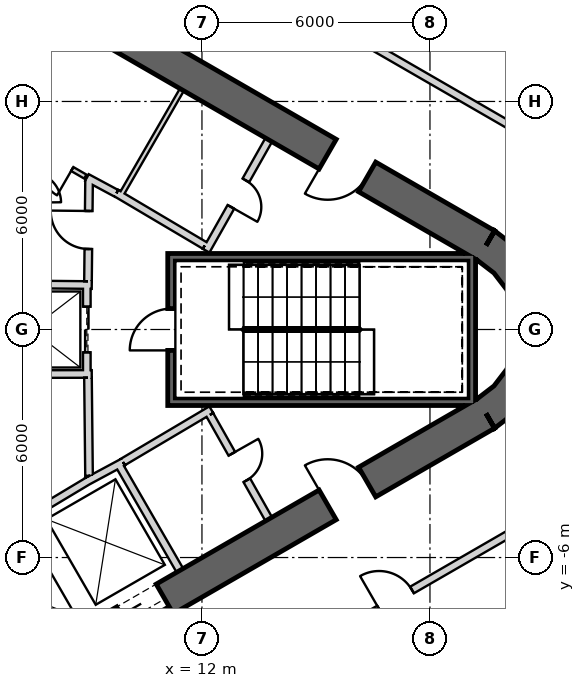
"""IFC4 building model, lengths in metres.
Left out: names, types, materials, properties, quantities, classifications, styles, units other than length and angle.
Written with IfcOpenShell. Run it as: python <this file> out.ifc"""

import sys

from ifc_helpers import new_model, si_unit, direction, frame, frame_2d, origin, place, context, subcontext, project, spatial, polyline, rectangle, outline, extrude, element, fill, save


model = new_model("IFC4")
c1 = context("Model", 3, precision=1e-05, world=origin(), true_north=direction((0.0, 1.0)))
c2 = subcontext(c1, "Body", "Model", "MODEL_VIEW")
j1 = project(units=[si_unit("LENGTHUNIT", "METRE"), si_unit("PLANEANGLEUNIT", "RADIAN")], contexts=[c1])
p1 = place(None, origin())
s1 = spatial("IfcSite", under=j1, at=p1, CompositionType="ELEMENT")
p2 = place(p1, origin())
s2 = spatial("IfcBuilding", under=s1, at=p2, CompositionType="ELEMENT")
p3 = place(p2, frame((0.0, 0.0, 398.3)))
s3 = spatial("IfcBuildingStorey", under=s2, at=p3, CompositionType="ELEMENT", Elevation=398.3)
p4 = place(p3, frame((19.475, 2.208, 0.0), z_axis=(0.0, 0.0, 1.0), x_axis=(-0.866028369851, 0.499994862586, 0.0)))
e1 = element("IfcWall", 1, at=p4, inside=s3, PredefinedType="SHEAR", context=c2, shape_type="SweptSolid", body=[
    extrude(rectangle(XDim=31.523, YDim=0.9, at=frame_2d((15.762, 0.0))), origin(), (0.0, 0.0, 1.0), 6.5),
])
p5 = place(p4, frame((3.612, 0.0, 0.0)))
e2 = element("IfcOpeningElement", 2, at=p5, cuts=e1, PredefinedType="OPENING", context=c2, shape_type="SweptSolid", body=[
    extrude(rectangle(XDim=1.2, YDim=2.4, at=frame_2d((0.6, 1.2))), frame((0.0, 0.46, 0.0), z_axis=(0.0, -1.0, 0.0), x_axis=(1.0, 0.0, 0.0)), (0.0, 0.0, 1.0), 0.92),
])
p6 = place(p4, frame((26.712, 0.0, 0.0)))
e3 = element("IfcOpeningElement", 3, at=p6, cuts=e1, PredefinedType="OPENING", context=c2, shape_type="SweptSolid", body=[
    extrude(rectangle(XDim=1.2, YDim=2.4, at=frame_2d((0.6, 1.2))), frame((0.0, 0.46, 0.0), z_axis=(0.0, -1.0, 0.0), x_axis=(1.0, 0.0, 0.0)), (0.0, 0.0, 1.0), 0.92),
])
p7 = place(p3, frame((-7.825, -17.97, 0.0), z_axis=(0.0, 0.0, 1.0), x_axis=(0.866028369851, 0.499994862586, 0.0)))
e4 = element("IfcWall", 4, at=p7, inside=s3, PredefinedType="SHEAR", context=c2, shape_type="SweptSolid", body=[
    extrude(rectangle(XDim=31.523, YDim=0.9, at=frame_2d((15.762, 0.0))), origin(), (0.0, 0.0, 1.0), 6.5),
])
p8 = place(p7, frame((7.062, 0.0, 0.0)))
e5 = element("IfcOpeningElement", 5, at=p8, cuts=e4, PredefinedType="OPENING", context=c2, shape_type="SweptSolid", body=[
    extrude(rectangle(XDim=1.2, YDim=2.4, at=frame_2d((0.6, 1.2))), frame((0.0, 0.46, 0.0), z_axis=(0.0, -1.0, 0.0), x_axis=(1.0, 0.0, 0.0)), (0.0, 0.0, 1.0), 0.92),
])
p9 = place(p7, frame((9.762, 0.0, 0.0)))
e6 = element("IfcOpeningElement", 6, at=p9, cuts=e4, PredefinedType="OPENING", context=c2, shape_type="SweptSolid", body=[
    extrude(rectangle(XDim=1.2, YDim=2.4, at=frame_2d((0.6, 1.2))), frame((0.0, 0.46, 0.0), z_axis=(0.0, -1.0, 0.0), x_axis=(1.0, 0.0, 0.0)), (0.0, 0.0, 1.0), 0.92),
])
p10 = place(p7, frame((17.862, 0.0, 0.0)))
e7 = element("IfcOpeningElement", 7, at=p10, cuts=e4, PredefinedType="OPENING", context=c2, shape_type="SweptSolid", body=[
    extrude(rectangle(XDim=1.2, YDim=2.4, at=frame_2d((0.6, 1.2))), frame((0.0, 0.46, 0.0), z_axis=(0.0, -1.0, 0.0), x_axis=(1.0, 0.0, 0.0)), (0.0, 0.0, 1.0), 0.92),
])
p11 = place(p7, frame((20.562, 0.0, 0.0)))
e8 = element("IfcOpeningElement", 8, at=p11, cuts=e4, PredefinedType="OPENING", context=c2, shape_type="SweptSolid", body=[
    extrude(rectangle(XDim=1.2, YDim=2.4, at=frame_2d((0.6, 1.2))), frame((0.0, 0.46, 0.0), z_axis=(0.0, -1.0, 0.0), x_axis=(1.0, 0.0, 0.0)), (0.0, 0.0, 1.0), 0.92),
])
p12 = place(p7, frame((26.712, 0.0, 0.0)))
e9 = element("IfcOpeningElement", 9, at=p12, cuts=e4, PredefinedType="OPENING", context=c2, shape_type="SweptSolid", body=[
    extrude(rectangle(XDim=1.2, YDim=2.4, at=frame_2d((0.6, 1.2))), frame((0.0, 0.46, 0.0), z_axis=(0.0, -1.0, 0.0), x_axis=(1.0, 0.0, 0.0)), (0.0, 0.0, 1.0), 0.92),
])
p13 = place(p7, frame((3.612, 0.0, 0.0)))
e10 = element("IfcOpeningElement", 10, at=p13, cuts=e4, PredefinedType="OPENING", context=c2, shape_type="SweptSolid", body=[
    extrude(rectangle(XDim=1.2, YDim=2.4, at=frame_2d((0.6, 1.2))), frame((0.0, 0.46, 0.0), z_axis=(0.0, -1.0, 0.0), x_axis=(1.0, 0.0, 0.0)), (0.0, 0.0, 1.0), 0.92),
])
p14 = place(p3, origin())
e11 = element("IfcWall", 11, at=p14, inside=s3, PredefinedType="SHEAR", context=c2, shape_type="SweptSolid", body=[
    extrude(outline(polyline([(19.7, -2.598), (20.321, -2.121), (20.798, -1.5), (21.098, -0.777), (21.2, 0.0), (21.098, 0.777), (20.798, 1.5), (20.321, 2.121), (19.7, 2.598), (19.25, 1.819), (19.685, 1.485), (20.019, 1.05), (20.229, 0.543), (20.3, 0.0), (20.229, -0.543), (20.019, -1.05), (19.685, -1.485), (19.25, -1.819), (19.7, -2.598)])), origin(), (0.0, 0.0, 1.0), 6.5),
])
p15 = place(p3, frame((9.795, -3.525, 0.0), z_axis=(0.0, 0.0, 1.0), x_axis=(0.499984717929, -0.866034226713, 0.0)))
e12 = element("IfcWall", 12, at=p15, inside=s3, PredefinedType="PLUMBINGWALL", context=c2, shape_type="SweptSolid", body=[
    extrude(rectangle(XDim=3.25, YDim=0.2, at=frame_2d((1.625, 0.0))), origin(), (0.0, 0.0, 1.0), 6.2),
])
p16 = place(p3, frame((8.974, -3.999, 0.0), z_axis=(0.0, 0.0, 1.0), x_axis=(0.880907015104, 0.473289373154, 0.0)))
e13 = element("IfcWall", 13, at=p16, inside=s3, PredefinedType="PLUMBINGWALL", context=c2, shape_type="SweptSolid", body=[
    extrude(rectangle(XDim=1.078, YDim=0.2, at=frame_2d((0.539, 0.0))), origin(), (0.0, 0.0, 1.0), 6.2),
])
p17 = place(p3, frame((7.497, -4.886, 0.0), z_axis=(0.0, 0.0, 1.0), x_axis=(0.857516281273, 0.51445682749, 0.0)))
e14 = element("IfcWall", 14, at=p17, inside=s3, PredefinedType="PLUMBINGWALL", context=c2, shape_type="SweptSolid", body=[
    extrude(rectangle(XDim=1.845, YDim=0.2, at=frame_2d((0.922, 0.0))), origin(), (0.0, 0.0, 1.0), 6.2),
])
p18 = place(p3, frame((19.2, 1.9, -0.3), z_axis=(0.0, 0.0, 1.0), x_axis=(-1.0, 0.0, 0.0)))
e15 = element("IfcWall", 15, at=p18, inside=s3, PredefinedType="SHEAR", context=c2, shape_type="SweptSolid", body=[
    extrude(rectangle(XDim=8.1, YDim=0.2, at=frame_2d((4.05, 0.0))), origin(), (0.0, 0.0, 1.0), 6.5),
])
p19 = place(p3, frame((19.1, -2.0, -0.3), z_axis=(0.0, 0.0, 1.0), x_axis=(0.0, 1.0, 0.0)))
e16 = element("IfcWall", 16, at=p19, inside=s3, PredefinedType="SHEAR", context=c2, shape_type="SweptSolid", body=[
    extrude(rectangle(XDim=3.8, YDim=0.2, at=frame_2d((1.9, 0.0))), origin(), (0.0, 0.0, 1.0), 6.5),
])
p20 = place(p3, frame((11.1, -1.9, -0.3), z_axis=(0.0, 0.0, 1.0), x_axis=(1.0, 0.0, 0.0)))
e17 = element("IfcWall", 17, at=p20, inside=s3, PredefinedType="SHEAR", context=c2, shape_type="SweptSolid", body=[
    extrude(rectangle(XDim=7.9, YDim=0.2, at=frame_2d((3.95, 0.0))), origin(), (0.0, 0.0, 1.0), 6.5),
])
p21 = place(p3, frame((11.2, -1.8, -0.3), z_axis=(0.0, 0.0, 1.0), x_axis=(0.0, 1.0, 0.0)))
e18 = element("IfcWall", 18, at=p21, inside=s3, PredefinedType="SHEAR", context=c2, shape_type="SweptSolid", body=[
    extrude(rectangle(XDim=3.6, YDim=0.2, at=frame_2d((1.8, 0.0))), origin(), (0.0, 0.0, 1.0), 6.5),
])
p22 = place(p21, frame((1.25, 0.0, 0.3)))
e19 = element("IfcOpeningElement", 19, at=p22, cuts=e18, PredefinedType="OPENING", context=c2, shape_type="SweptSolid", body=[
    extrude(rectangle(XDim=1.1, YDim=2.1, at=frame_2d((0.55, 1.05))), frame((0.0, 0.11, 0.0), z_axis=(0.0, -1.0, 0.0), x_axis=(1.0, 0.0, 0.0)), (0.0, 0.0, 1.0), 0.22),
])
p23 = place(p3, frame((8.97, 1.2, 0.0), z_axis=(0.0, 0.0, 1.0), x_axis=(0.0, -1.0, 0.0)))
e20 = element("IfcWall", 20, at=p23, inside=s3, PredefinedType="PLUMBINGWALL", context=c2, shape_type="SweptSolid", body=[
    extrude(rectangle(XDim=2.4, YDim=0.2, at=frame_2d((1.2, 0.0))), origin(), (0.0, 0.0, 1.0), 6.2),
])
p24 = place(p23, frame((0.6, 0.0, 0.0)))
e21 = element("IfcOpeningElement", 21, at=p24, cuts=e20, PredefinedType="OPENING", context=c2, shape_type="SweptSolid", body=[
    extrude(rectangle(XDim=1.2, YDim=2.4, at=frame_2d((0.6, 1.2))), frame((0.0, 0.11, 0.0), z_axis=(0.0, -1.0, 0.0), x_axis=(1.0, 0.0, 0.0)), (0.0, 0.0, 1.0), 0.22),
])
p25 = place(p3, frame((9.1, -1.17, 0.0), z_axis=(0.0, 0.0, 1.0), x_axis=(-0.999998675455, -0.001627602011, 0.0)))
e22 = element("IfcWall", 22, at=p25, inside=s3, PredefinedType="PLUMBINGWALL", context=c2, shape_type="SweptSolid", body=[
    extrude(rectangle(XDim=3.0, YDim=0.2, at=frame_2d((1.5, 0.0))), origin(), (0.0, 0.0, 1.0), 6.2),
])
p26 = place(p3, frame((9.1, 1.169, 0.0), z_axis=(0.0, 0.0, 1.0), x_axis=(-0.99994990606, 0.010009264196, 0.0)))
e23 = element("IfcWall", 23, at=p26, inside=s3, PredefinedType="PLUMBINGWALL", context=c2, shape_type="SweptSolid", body=[
    extrude(rectangle(XDim=3.0, YDim=0.2, at=frame_2d((1.5, 0.0))), origin(), (0.0, 0.0, 1.0), 6.2),
])
p27 = place(p3, frame((9.847, 3.495, 0.0), z_axis=(0.0, 0.0, 1.0), x_axis=(0.499984717929, 0.866034226713, 0.0)))
e24 = element("IfcWall", 24, at=p27, inside=s3, PredefinedType="PARTITIONING", context=c2, shape_type="SweptSolid", body=[
    extrude(rectangle(XDim=3.25, YDim=0.12, at=frame_2d((1.625, 0.0))), origin(), (0.0, 0.0, 1.0), 6.2),
])
p28 = place(p3, frame((12.11, 2.073, 0.0), z_axis=(0.0, 0.0, 1.0), x_axis=(0.49196600604, 0.870614408852, 0.0)))
e25 = element("IfcWall", 25, at=p28, inside=s3, PredefinedType="PARTITIONING", context=c2, shape_type="SweptSolid", body=[
    extrude(rectangle(XDim=3.35, YDim=0.2, at=frame_2d((1.675, 0.0))), origin(), (0.0, 0.0, 1.0), 6.2),
])
p29 = place(p28, frame((1.325, 0.0, 0.0)))
e26 = element("IfcOpeningElement", 26, at=p29, cuts=e25, PredefinedType="OPENING", context=c2, shape_type="SweptSolid", body=[
    extrude(rectangle(XDim=0.8, YDim=2.1, at=frame_2d((0.4, 1.05))), frame((0.0, 0.11, 0.0), z_axis=(0.0, -1.0, 0.0), x_axis=(1.0, 0.0, 0.0)), (0.0, 0.0, 1.0), 0.22),
])
p30 = place(p3, frame((9.75, 3.587, 0.0), z_axis=(0.0, 0.0, 1.0), x_axis=(0.860414880418, -0.509594185166, 0.0)))
e27 = element("IfcWall", 27, at=p30, inside=s3, PredefinedType="PARTITIONING", context=c2, shape_type="SweptSolid", body=[
    extrude(rectangle(XDim=2.7, YDim=0.2, at=frame_2d((1.35, 0.0))), origin(), (0.0, 0.0, 1.0), 6.2),
])
p31 = place(p3, frame((8.974, 3.999, 0.0), z_axis=(0.0, 0.0, 1.0), x_axis=(0.880917147855, -0.473270513147, 0.0)))
e28 = element("IfcWall", 28, at=p31, inside=s3, PredefinedType="PARTITIONING", context=c2, shape_type="SweptSolid", body=[
    extrude(rectangle(XDim=0.878, YDim=0.2, at=frame_2d((0.439, 0.0))), origin(), (0.0, 0.0, 1.0), 6.2),
])
p32 = place(p3, frame((7.55, 4.821, 0.0), z_axis=(0.0, 0.0, 1.0), x_axis=(0.866019818373, -0.500009674092, 0.0)))
e29 = element("IfcWall", 29, at=p32, inside=s3, PredefinedType="PARTITIONING", context=c2, shape_type="SweptSolid", body=[
    extrude(rectangle(XDim=1.594, YDim=0.12, at=frame_2d((0.797, 0.0))), origin(), (0.0, 0.0, 1.0), 6.2),
])
p33 = place(p32, frame((0.397, 0.0, 0.0)))
e30 = element("IfcOpeningElement", 30, at=p33, cuts=e29, PredefinedType="OPENING", context=c2, shape_type="SweptSolid", body=[
    extrude(rectangle(XDim=0.8, YDim=2.1, at=frame_2d((0.4, 1.05))), frame((0.0, 0.07, 0.0), z_axis=(0.0, -1.0, 0.0), x_axis=(1.0, 0.0, 0.0)), (0.0, 0.0, 1.0), 0.14),
])
p34 = place(p3, frame((12.245, -2.109, 0.0), z_axis=(0.0, 0.0, 1.0), x_axis=(-0.860414880418, -0.509594185166, 0.0)))
e31 = element("IfcWall", 31, at=p34, inside=s3, PredefinedType="PARTITIONING", context=c2, shape_type="SweptSolid", body=[
    extrude(rectangle(XDim=2.7, YDim=0.2, at=frame_2d((1.35, 0.0))), origin(), (0.0, 0.0, 1.0), 6.2),
])
p35 = place(p3, frame((13.758, -4.99, 0.0), z_axis=(0.0, 0.0, 1.0), x_axis=(-0.491993409184, 0.87059892334, 0.0)))
e32 = element("IfcWall", 32, at=p35, inside=s3, PredefinedType="PARTITIONING", context=c2, shape_type="SweptSolid", body=[
    extrude(rectangle(XDim=3.15, YDim=0.2, at=frame_2d((1.575, 0.0))), origin(), (0.0, 0.0, 1.0), 6.2),
])
p36 = place(p35, frame((1.175, 0.0, 0.0)))
e33 = element("IfcOpeningElement", 33, at=p36, cuts=e32, PredefinedType="OPENING", context=c2, shape_type="SweptSolid", body=[
    extrude(rectangle(XDim=0.8, YDim=2.1, at=frame_2d((0.4, 1.05))), frame((0.0, 0.11, 0.0), z_axis=(0.0, -1.0, 0.0), x_axis=(1.0, 0.0, 0.0)), (0.0, 0.0, 1.0), 0.22),
])
p37 = place(p3, frame((9.029, -3.851, 0.0), z_axis=(0.0, 0.0, 1.0), x_axis=(-0.010784614026, 0.999941844359, 0.0)))
e34 = element("IfcWall", 34, at=p37, inside=s3, PredefinedType="PARTITIONING", context=c2, shape_type="SweptSolid", body=[
    extrude(rectangle(XDim=2.581, YDim=0.2, at=frame_2d((1.291, 0.0))), origin(), (0.0, 0.0, 1.0), 6.2),
])
p38 = place(p3, frame((9.001, 1.27, 0.0), z_axis=(0.0, 0.0, 1.0), x_axis=(0.010723968736, 0.999942496594, 0.0)))
e35 = element("IfcWall", 35, at=p38, inside=s3, PredefinedType="PARTITIONING", context=c2, shape_type="SweptSolid", body=[
    extrude(rectangle(XDim=2.709, YDim=0.2, at=frame_2d((1.354, 0.0))), origin(), (0.0, 0.0, 1.0), 6.2),
])
p39 = place(p38, frame((0.848, 0.0, 0.0)))
e36 = element("IfcOpeningElement", 36, at=p39, cuts=e35, PredefinedType="OPENING", context=c2, shape_type="SweptSolid", body=[
    extrude(rectangle(XDim=1.0, YDim=2.1, at=frame_2d((0.5, 1.05))), frame((0.0, 0.11, 0.0), z_axis=(0.0, -1.0, 0.0), x_axis=(1.0, 0.0, 0.0)), (0.0, 0.0, 1.0), 0.22),
])
p40 = place(p3, frame((21.552, 4.531, 0.0), z_axis=(0.0, 0.0, 1.0), x_axis=(-0.86602469383, 0.500001229675, 0.0)))
e37 = element("IfcWall", 37, at=p40, inside=s3, PredefinedType="PARTITIONING", context=c2, shape_type="SweptSolid", body=[
    extrude(rectangle(XDim=15.97, YDim=0.2, at=frame_2d((7.985, 0.0))), origin(), (0.0, 0.0, 1.0), 5.57),
])
p41 = place(p40, frame((7.5, 0.0, 0.0)))
e38 = element("IfcOpeningElement", 38, at=p41, cuts=e37, PredefinedType="OPENING", context=c2, shape_type="SweptSolid", body=[
    extrude(rectangle(XDim=1.0, YDim=2.1, at=frame_2d((0.5, 1.05))), frame((0.0, 0.11, 0.0), z_axis=(0.0, -1.0, 0.0), x_axis=(1.0, 0.0, 0.0)), (0.0, 0.0, 1.0), 0.22),
])
p42 = place(p3, frame((12.802, -9.583, 0.0), z_axis=(0.0, 0.0, 1.0), x_axis=(0.866025905529, 0.499999130952, 0.0)))
e39 = element("IfcWall", 39, at=p42, inside=s3, PredefinedType="PARTITIONING", context=c2, shape_type="SweptSolid", body=[
    extrude(rectangle(XDim=9.904, YDim=0.2, at=frame_2d((4.952, 0.0))), origin(), (0.0, 0.0, 1.0), 5.57),
])
p43 = place(p42, frame((4.456, 0.0, 0.0)))
e40 = element("IfcOpeningElement", 40, at=p43, cuts=e39, PredefinedType="OPENING", context=c2, shape_type="SweptSolid", body=[
    extrude(rectangle(XDim=1.0, YDim=2.1, at=frame_2d((0.5, 1.05))), frame((0.0, 0.11, 0.0), z_axis=(0.0, -1.0, 0.0), x_axis=(1.0, 0.0, 0.0)), (0.0, 0.0, 1.0), 0.22),
])
p44 = place(p22, origin())
e41 = element("IfcDoor", 41, at=p44, inside=s3, OperationType="SINGLE_SWING_LEFT", PredefinedType="USERDEFINED", context=c2, shape_type="SweptSolid", body=[
    extrude(rectangle(XDim=1.1, YDim=2.1, at=frame_2d((0.55, 1.05))), frame((0.0, 0.025, 0.0), z_axis=(0.0, -1.0, 0.0), x_axis=(1.0, 0.0, 0.0)), (0.0, 0.0, 1.0), 0.05),
])
fill(e19, e41)
p45 = place(p39, origin())
e42 = element("IfcDoor", 42, at=p45, inside=s3, OperationType="SINGLE_SWING_RIGHT", PredefinedType="USERDEFINED", context=c2, shape_type="SweptSolid", body=[
    extrude(rectangle(XDim=1.0, YDim=2.1, at=frame_2d((0.5, 1.05))), frame((0.0, 0.025, 0.0), z_axis=(0.0, -1.0, 0.0), x_axis=(1.0, 0.0, 0.0)), (0.0, 0.0, 1.0), 0.05),
])
fill(e36, e42)
p46 = place(p24, origin())
e43 = element("IfcDoor", 43, at=p46, inside=s3, OperationType="SLIDING_TO_LEFT", PredefinedType="USERDEFINED", context=c2, shape_type="SweptSolid", body=[
    extrude(rectangle(XDim=1.2, YDim=2.4, at=frame_2d((0.6, 1.2))), frame((0.0, 0.025, 0.0), z_axis=(0.0, -1.0, 0.0), x_axis=(1.0, 0.0, 0.0)), (0.0, 0.0, 1.0), 0.05),
])
fill(e21, e43)
p47 = place(p29, origin())
e44 = element("IfcDoor", 44, at=p47, inside=s3, OperationType="SINGLE_SWING_LEFT", PredefinedType="USERDEFINED", context=c2, shape_type="SweptSolid", body=[
    extrude(rectangle(XDim=0.8, YDim=2.1, at=frame_2d((0.4, 1.05))), frame((0.0, 0.025, 0.0), z_axis=(0.0, -1.0, 0.0), x_axis=(1.0, 0.0, 0.0)), (0.0, 0.0, 1.0), 0.05),
])
fill(e26, e44)
p48 = place(p33, origin())
e45 = element("IfcDoor", 45, at=p48, inside=s3, OperationType="SINGLE_SWING_RIGHT", PredefinedType="USERDEFINED", context=c2, shape_type="SweptSolid", body=[
    extrude(rectangle(XDim=0.8, YDim=2.1, at=frame_2d((0.4, 1.05))), frame((0.0, 0.025, 0.0), z_axis=(0.0, -1.0, 0.0), x_axis=(1.0, 0.0, 0.0)), (0.0, 0.0, 1.0), 0.05),
])
fill(e30, e45)
p49 = place(p36, origin())
e46 = element("IfcDoor", 46, at=p49, inside=s3, OperationType="SINGLE_SWING_RIGHT", PredefinedType="USERDEFINED", context=c2, shape_type="SweptSolid", body=[
    extrude(rectangle(XDim=0.8, YDim=2.1, at=frame_2d((0.4, 1.05))), frame((0.0, 0.025, 0.0), z_axis=(0.0, -1.0, 0.0), x_axis=(1.0, 0.0, 0.0)), (0.0, 0.0, 1.0), 0.05),
])
fill(e33, e46)
p50 = place(p43, origin())
e47 = element("IfcDoor", 47, at=p50, inside=s3, OperationType="SINGLE_SWING_LEFT", PredefinedType="USERDEFINED", context=c2, shape_type="SweptSolid", body=[
    extrude(rectangle(XDim=1.0, YDim=2.1, at=frame_2d((0.5, 1.05))), frame((0.0, 0.025, 0.0), z_axis=(0.0, -1.0, 0.0), x_axis=(1.0, 0.0, 0.0)), (0.0, 0.0, 1.0), 0.05),
])
fill(e40, e47)
p51 = place(p11, origin())
e48 = element("IfcDoor", 48, at=p51, inside=s3, OperationType="SLIDING_TO_LEFT", PredefinedType="USERDEFINED", context=c2, shape_type="SweptSolid", body=[
    extrude(rectangle(XDim=1.2, YDim=2.4, at=frame_2d((0.6, 1.2))), frame((0.0, 0.025, 0.0), z_axis=(0.0, -1.0, 0.0), x_axis=(1.0, 0.0, 0.0)), (0.0, 0.0, 1.0), 0.05),
])
fill(e8, e48)
p52 = place(p12, origin())
e49 = element("IfcDoor", 49, at=p52, inside=s3, OperationType="SINGLE_SWING_LEFT", PredefinedType="USERDEFINED", context=c2, shape_type="SweptSolid", body=[
    extrude(rectangle(XDim=1.2, YDim=2.4, at=frame_2d((0.6, 1.2))), frame((0.0, 0.025, 0.0), z_axis=(0.0, -1.0, 0.0), x_axis=(1.0, 0.0, 0.0)), (0.0, 0.0, 1.0), 0.05),
])
fill(e9, e49)
p53 = place(p5, origin())
e50 = element("IfcDoor", 50, at=p53, inside=s3, OperationType="SINGLE_SWING_RIGHT", PredefinedType="USERDEFINED", context=c2, shape_type="SweptSolid", body=[
    extrude(rectangle(XDim=1.2, YDim=2.4, at=frame_2d((0.6, 1.2))), frame((0.0, 0.025, 0.0), z_axis=(0.0, -1.0, 0.0), x_axis=(1.0, 0.0, 0.0)), (0.0, 0.0, 1.0), 0.05),
])
fill(e2, e50)
save(model, sys.argv[1])
